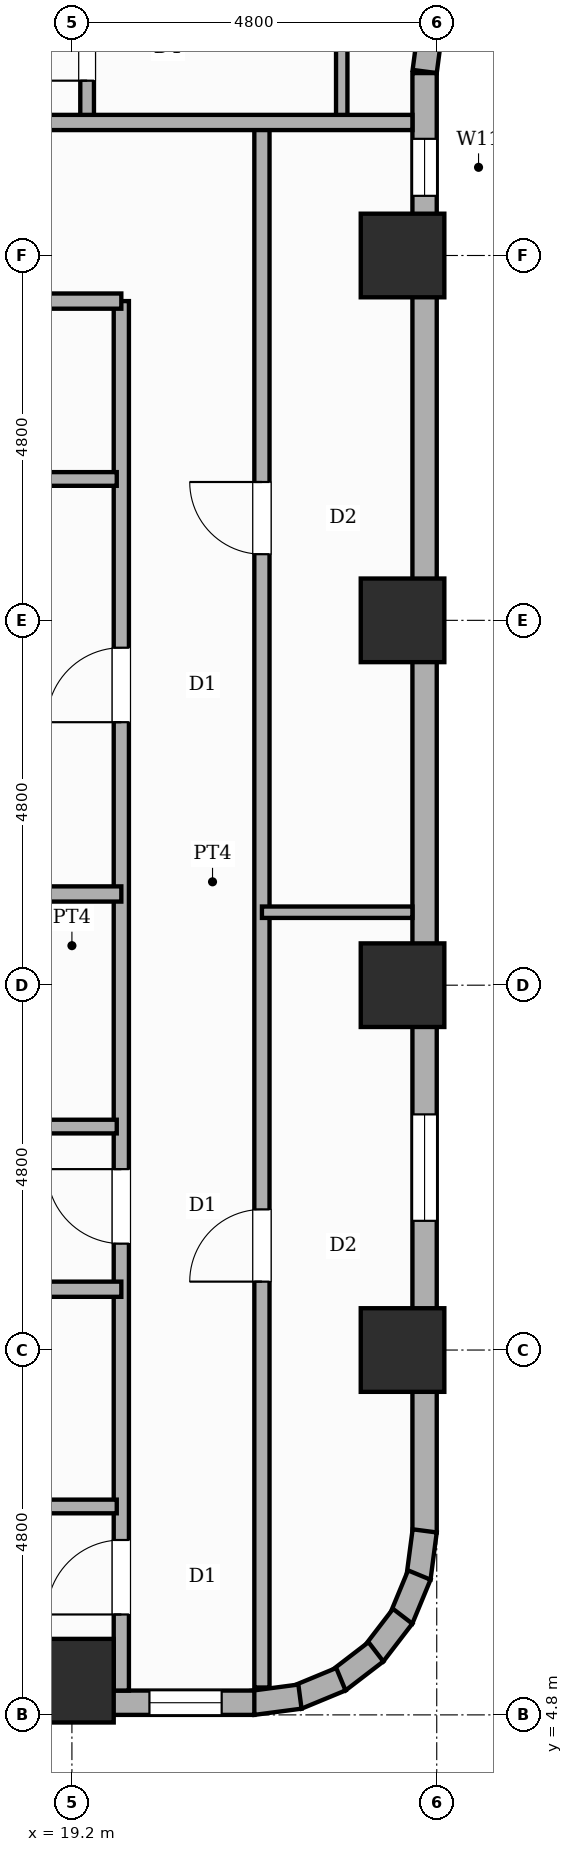
"""IFC4 building model, lengths in metres.
Left out: names, types, materials, properties, quantities, classifications, styles, units other than length and angle.
Written with IfcOpenShell. Run it as: python <this file> out.ifc"""

import sys

from ifc_helpers import new_model, si_unit, direction, frame, frame_2d, origin, origin_2d, place, context, subcontext, project, spatial, rectangle, extrude, element, fill, save


model = new_model("IFC4")
c1 = context("Model", 3, precision=1e-05, world=origin(), true_north=direction((0.0, 1.0)))
c2 = subcontext(c1, "Body", "Model", "MODEL_VIEW")
j1 = project(units=[si_unit("LENGTHUNIT", "METRE"), si_unit("PLANEANGLEUNIT", "RADIAN")], contexts=[c1])
p1 = place(None, origin())
s1 = spatial("IfcSite", under=j1, at=p1, CompositionType="ELEMENT")
p2 = place(p1, origin())
s2 = spatial("IfcBuilding", under=s1, at=p2, CompositionType="ELEMENT")
p3 = place(p2, frame((0.0, 0.0, 79.0)))
s3 = spatial("IfcBuildingStorey", under=s2, at=p3, CompositionType="ELEMENT", Elevation=79.0)
for number, where, z_axis, x_axis in (
    (1, (19.2, 5.25, 0.0), (0.0, 0.0, 1.0), (1.0, 0.0, 0.0)),
    (2, (23.55, 9.6, 0.0), (0.0, 0.0, 1.0), (1.0, 0.0, 0.0)),
    (3, (23.55, 14.4, 0.0), (0.0, 0.0, 1.0), (1.0, 0.0, 0.0)),
    (4, (23.55, 19.2, 0.0), (0.0, 0.0, 1.0), (1.0, 0.0, 0.0)),
    (5, (23.55, 24.0, 0.0), (0.0, 0.0, 1.0), (1.0, 0.0, 0.0)),
):
    element("IfcColumn", number, at=place(p3, frame(where, z_axis=z_axis, x_axis=x_axis)), inside=s3, PredefinedType="COLUMN", context=c2, shape_type="SweptSolid", body=[
        extrude(rectangle(XDim=1.1, YDim=1.1, at=origin_2d()), origin(), (0.0, 0.0, 1.0), 3.6),
    ])
p4 = place(p3, frame((23.923, 27.042, 0.0), z_axis=(0.0, 0.0, 1.0), x_axis=(-0.130555323746, -0.9914410257, 0.0)))
e6 = element("IfcWall", 6, at=p4, inside=s3, PredefinedType="STANDARD", context=c2, shape_type="SweptSolid", body=[
    extrude(rectangle(XDim=0.626, YDim=0.32, at=frame_2d((0.313, 0.0))), origin(), (0.0, 0.0, 1.0), 2.53),
])
p5 = place(p3, frame((23.84, 26.4, 0.0), z_axis=(0.0, 0.0, 1.0), x_axis=(0.0, -1.0, 0.0)))
e7 = element("IfcWall", 7, at=p5, inside=s3, PredefinedType="STANDARD", context=c2, shape_type="SweptSolid", body=[
    extrude(rectangle(XDim=19.2, YDim=0.32, at=frame_2d((9.6, 0.0))), origin(), (0.0, 0.0, 1.0), 2.53),
])
p6 = place(p5, frame((13.7, 0.0, 0.65)))
e8 = element("IfcOpeningElement", 8, at=p6, cuts=e7, PredefinedType="OPENING", context=c2, shape_type="SweptSolid", body=[
    extrude(rectangle(XDim=1.4, YDim=1.1, at=frame_2d((0.7, 0.55))), frame((0.0, 0.17, 0.0), z_axis=(0.0, -1.0, 0.0), x_axis=(1.0, 0.0, 0.0)), (0.0, 0.0, 1.0), 0.34),
])
p7 = place(p5, frame((0.865, 0.0, 0.45)))
e9 = element("IfcOpeningElement", 9, at=p7, cuts=e7, PredefinedType="OPENING", context=c2, shape_type="SweptSolid", body=[
    extrude(rectangle(XDim=0.75, YDim=1.8, at=frame_2d((0.375, 0.9))), frame((0.0, 0.17, 0.0), z_axis=(0.0, -1.0, 0.0), x_axis=(1.0, 0.0, 0.0)), (0.0, 0.0, 1.0), 0.34),
])
p8 = place(p3, frame((23.841, 7.221, 0.0), z_axis=(0.0, 0.0, 1.0), x_axis=(-0.130504898859, -0.991447664465, 0.0)))
e10 = element("IfcWall", 10, at=p8, inside=s3, PredefinedType="STANDARD", context=c2, shape_type="SweptSolid", body=[
    extrude(rectangle(XDim=0.627, YDim=0.32, at=frame_2d((0.313, 0.0))), origin(), (0.0, 0.0, 1.0), 3.35),
])
p9 = place(p3, frame((23.771, 6.64, 0.0), z_axis=(0.0, 0.0, 1.0), x_axis=(-0.382787856107, -0.923836271867, 0.0)))
e11 = element("IfcWall", 11, at=p9, inside=s3, PredefinedType="STANDARD", context=c2, shape_type="SweptSolid", body=[
    extrude(rectangle(XDim=0.626, YDim=0.32, at=frame_2d((0.313, 0.0))), origin(), (0.0, 0.0, 1.0), 3.35),
])
p10 = place(p3, frame((23.552, 6.097, 0.0), z_axis=(0.0, 0.0, 1.0), x_axis=(-0.608693302629, -0.793405610854, 0.0)))
e12 = element("IfcWall", 12, at=p10, inside=s3, PredefinedType="STANDARD", context=c2, shape_type="SweptSolid", body=[
    extrude(rectangle(XDim=0.626, YDim=0.32, at=frame_2d((0.313, 0.0))), origin(), (0.0, 0.0, 1.0), 3.35),
])
p11 = place(p3, frame((23.2, 5.63, 0.0), z_axis=(0.0, 0.0, 1.0), x_axis=(-0.7932174212, -0.608938521285, 0.0)))
e13 = element("IfcWall", 13, at=p11, inside=s3, PredefinedType="STANDARD", context=c2, shape_type="SweptSolid", body=[
    extrude(rectangle(XDim=0.627, YDim=0.32, at=frame_2d((0.313, 0.0))), origin(), (0.0, 0.0, 1.0), 3.35),
])
for number, where, z_axis, x_axis in (
    (14, (22.739, 5.269, 0.0), (0.0, 0.0, 1.0), (-0.924, -0.383, 0.0)),
    (15, (22.2, 5.04, 0.0), (0.0, 0.0, 1.0), (-0.991, -0.131, 0.0)),
):
    element("IfcWall", number, at=place(p3, frame(where, z_axis=z_axis, x_axis=x_axis)), inside=s3, PredefinedType="STANDARD", context=c2, shape_type="SweptSolid", body=[
        extrude(rectangle(XDim=0.626, YDim=0.32, at=frame_2d((0.313, 0.0))), origin(), (0.0, 0.0, 1.0), 3.35),
    ])
p12 = place(p3, frame((21.6, 4.96, 0.0), z_axis=(0.0, 0.0, 1.0), x_axis=(-1.0, 0.0, 0.0)))
e16 = element("IfcWall", 16, at=p12, inside=s3, PredefinedType="STANDARD", context=c2, shape_type="SweptSolid", body=[
    extrude(rectangle(XDim=14.4, YDim=0.32, at=frame_2d((7.2, 0.0))), origin(), (0.0, 0.0, 1.0), 2.53),
])
p13 = place(p12, frame((4.1, 0.0, 0.65)))
e17 = element("IfcOpeningElement", 17, at=p13, cuts=e16, PredefinedType="OPENING", context=c2, shape_type="SweptSolid", body=[
    extrude(rectangle(XDim=1.4, YDim=1.1, at=frame_2d((0.7, 0.55))), frame((0.0, 0.17, 0.0), z_axis=(0.0, -1.0, 0.0), x_axis=(1.0, 0.0, 0.0)), (0.0, 0.0, 1.0), 0.34),
])
p14 = place(p12, frame((0.43, 0.0, 0.45)))
e18 = element("IfcOpeningElement", 18, at=p14, cuts=e16, PredefinedType="OPENING", context=c2, shape_type="SweptSolid", body=[
    extrude(rectangle(XDim=0.95, YDim=1.8, at=frame_2d((0.475, 0.9))), frame((0.0, 0.17, 0.0), z_axis=(0.0, -1.0, 0.0), x_axis=(1.0, 0.0, 0.0)), (0.0, 0.0, 1.0), 0.34),
])
p15 = place(p3, frame((22.75, 25.75, 0.0), z_axis=(0.0, 0.0, 1.0), x_axis=(0.0, 1.0, 0.0)))
e19 = element("IfcWall", 19, at=p15, inside=s3, PredefinedType="PARTITIONING", context=c2, shape_type="SweptSolid", body=[
    extrude(rectangle(XDim=2.25, YDim=0.15, at=frame_2d((1.125, 0.0))), origin(), (0.0, 0.0, 1.0), 3.35),
])
p16 = place(p3, frame((19.4, 25.75, 0.0), z_axis=(0.0, 0.0, 1.0), x_axis=(0.0, 1.0, 0.0)))
e20 = element("IfcWall", 20, at=p16, inside=s3, PredefinedType="PLUMBINGWALL", context=c2, shape_type="SweptSolid", body=[
    extrude(rectangle(XDim=2.25, YDim=0.18, at=frame_2d((1.125, 0.0))), origin(), (0.0, 0.0, 1.0), 3.35),
])
p17 = place(p16, frame((0.55, 0.0, 0.0)))
e21 = element("IfcOpeningElement", 21, at=p17, cuts=e20, PredefinedType="OPENING", context=c2, shape_type="SweptSolid", body=[
    extrude(rectangle(XDim=0.86, YDim=2.1, at=frame_2d((0.43, 1.05))), frame((0.0, 0.1, 0.0), z_axis=(0.0, -1.0, 0.0), x_axis=(1.0, 0.0, 0.0)), (0.0, 0.0, 1.0), 0.2),
])
p18 = place(p3, frame((19.85, 5.12, 0.0), z_axis=(0.0, 0.0, 1.0), x_axis=(0.0, 1.0, 0.0)))
e22 = element("IfcWall", 22, at=p18, inside=s3, PredefinedType="PARTITIONING", context=c2, shape_type="SweptSolid", body=[
    extrude(rectangle(XDim=18.28, YDim=0.2, at=frame_2d((9.14, 0.0))), origin(), (0.0, 0.0, 1.0), 3.35),
])
p19 = place(p18, frame((1.001, 0.0, 0.0)))
e23 = element("IfcOpeningElement", 23, at=p19, cuts=e22, PredefinedType="OPENING", context=c2, shape_type="SweptSolid", body=[
    extrude(rectangle(XDim=0.98, YDim=2.18, at=frame_2d((0.49, 1.09))), frame((0.0, 0.11, 0.0), z_axis=(0.0, -1.0, 0.0), x_axis=(1.0, 0.0, 0.0)), (0.0, 0.0, 1.0), 0.22),
])
p20 = place(p18, frame((5.88, 0.0, 0.0)))
e24 = element("IfcOpeningElement", 24, at=p20, cuts=e22, PredefinedType="OPENING", context=c2, shape_type="SweptSolid", body=[
    extrude(rectangle(XDim=0.98, YDim=2.18, at=frame_2d((0.49, 1.09))), frame((0.0, 0.11, 0.0), z_axis=(0.0, -1.0, 0.0), x_axis=(1.0, 0.0, 0.0)), (0.0, 0.0, 1.0), 0.22),
])
p21 = place(p18, frame((12.74, 0.0, 0.0)))
e25 = element("IfcOpeningElement", 25, at=p21, cuts=e22, PredefinedType="OPENING", context=c2, shape_type="SweptSolid", body=[
    extrude(rectangle(XDim=0.98, YDim=2.18, at=frame_2d((0.49, 1.09))), frame((0.0, 0.11, 0.0), z_axis=(0.0, -1.0, 0.0), x_axis=(1.0, 0.0, 0.0)), (0.0, 0.0, 1.0), 0.22),
])
p22 = place(p3, frame((21.7, 5.16, 0.0), z_axis=(0.0, 0.0, 1.0), x_axis=(0.0, 1.0, 0.0)))
e26 = element("IfcWall", 26, at=p22, inside=s3, PredefinedType="PARTITIONING", context=c2, shape_type="SweptSolid", body=[
    extrude(rectangle(XDim=20.59, YDim=0.2, at=frame_2d((10.295, 0.0))), origin(), (0.0, 0.0, 1.0), 3.35),
])
p23 = place(p22, frame((5.34, 0.0, 0.0)))
e27 = element("IfcOpeningElement", 27, at=p23, cuts=e26, PredefinedType="OPENING", context=c2, shape_type="SweptSolid", body=[
    extrude(rectangle(XDim=0.95, YDim=2.15, at=frame_2d((0.475, 1.075))), frame((0.0, 0.11, 0.0), z_axis=(0.0, -1.0, 0.0), x_axis=(1.0, 0.0, 0.0)), (0.0, 0.0, 1.0), 0.22),
])
p24 = place(p22, frame((14.91, 0.0, 0.0)))
e28 = element("IfcOpeningElement", 28, at=p24, cuts=e26, PredefinedType="OPENING", context=c2, shape_type="SweptSolid", body=[
    extrude(rectangle(XDim=0.95, YDim=2.15, at=frame_2d((0.475, 1.075))), frame((0.0, 0.11, 0.0), z_axis=(0.0, -1.0, 0.0), x_axis=(1.0, 0.0, 0.0)), (0.0, 0.0, 1.0), 0.22),
])
p25 = place(p3, frame((5.12, 23.4, 0.0), z_axis=(0.0, 0.0, 1.0), x_axis=(1.0, 0.0, 0.0)))
e29 = element("IfcWall", 29, at=p25, inside=s3, PredefinedType="PARTITIONING", context=c2, shape_type="SweptSolid", body=[
    extrude(rectangle(XDim=14.73, YDim=0.2, at=frame_2d((7.365, 0.0))), origin(), (0.0, 0.0, 1.0), 3.35),
])
p26 = place(p3, frame((15.5, 25.75, 0.0), z_axis=(0.0, 0.0, 1.0), x_axis=(1.0, 0.0, 0.0)))
e30 = element("IfcWall", 30, at=p26, inside=s3, PredefinedType="PARTITIONING", context=c2, shape_type="SweptSolid", body=[
    extrude(rectangle(XDim=8.18, YDim=0.2, at=frame_2d((4.09, 0.0))), origin(), (0.0, 0.0, 1.0), 3.35),
])
p27 = place(p3, frame((5.12, 7.542, 0.0), z_axis=(0.0, 0.0, 1.0), x_axis=(1.0, 0.0, 0.0)))
e31 = element("IfcWall", 31, at=p27, inside=s3, PredefinedType="PLUMBINGWALL", context=c2, shape_type="SweptSolid", body=[
    extrude(rectangle(XDim=14.67, YDim=0.18, at=frame_2d((7.335, 0.0))), origin(), (0.0, 0.0, 1.0), 3.35),
])
p28 = place(p27, frame((3.145, 0.0, 0.0)))
e32 = element("IfcOpeningElement", 32, at=p28, cuts=e31, PredefinedType="OPENING", context=c2, shape_type="SweptSolid", body=[
    extrude(rectangle(XDim=0.86, YDim=2.1, at=frame_2d((0.43, 1.05))), frame((0.0, 0.1, 0.0), z_axis=(0.0, -1.0, 0.0), x_axis=(1.0, 0.0, 0.0)), (0.0, 0.0, 1.0), 0.2),
])
p29 = place(p27, frame((10.56, 0.0, 0.0)))
e33 = element("IfcOpeningElement", 33, at=p29, cuts=e31, PredefinedType="OPENING", context=c2, shape_type="SweptSolid", body=[
    extrude(rectangle(XDim=0.86, YDim=2.1, at=frame_2d((0.43, 1.05))), frame((0.0, 0.1, 0.0), z_axis=(0.0, -1.0, 0.0), x_axis=(1.0, 0.0, 0.0)), (0.0, 0.0, 1.0), 0.2),
])
p30 = place(p3, frame((5.12, 10.4, 0.0), z_axis=(0.0, 0.0, 1.0), x_axis=(1.0, 0.0, 0.0)))
e34 = element("IfcWall", 34, at=p30, inside=s3, PredefinedType="SOLIDWALL", context=c2, shape_type="SweptSolid", body=[
    extrude(rectangle(XDim=14.73, YDim=0.2, at=frame_2d((7.365, 0.0))), origin(), (0.0, 0.0, 1.0), 3.35),
])
p31 = place(p3, frame((5.12, 12.54, 0.0), z_axis=(0.0, 0.0, 1.0), x_axis=(1.0, 0.0, 0.0)))
e35 = element("IfcWall", 35, at=p31, inside=s3, PredefinedType="PLUMBINGWALL", context=c2, shape_type="SweptSolid", body=[
    extrude(rectangle(XDim=14.67, YDim=0.18, at=frame_2d((7.335, 0.0))), origin(), (0.0, 0.0, 1.0), 3.35),
])
p32 = place(p31, frame((3.145, 0.0, 0.0)))
e36 = element("IfcOpeningElement", 36, at=p32, cuts=e35, PredefinedType="OPENING", context=c2, shape_type="SweptSolid", body=[
    extrude(rectangle(XDim=0.86, YDim=2.1, at=frame_2d((0.43, 1.05))), frame((0.0, 0.1, 0.0), z_axis=(0.0, -1.0, 0.0), x_axis=(1.0, 0.0, 0.0)), (0.0, 0.0, 1.0), 0.2),
])
p33 = place(p31, frame((10.56, 0.0, 0.0)))
e37 = element("IfcOpeningElement", 37, at=p33, cuts=e35, PredefinedType="OPENING", context=c2, shape_type="SweptSolid", body=[
    extrude(rectangle(XDim=0.86, YDim=2.1, at=frame_2d((0.43, 1.05))), frame((0.0, 0.1, 0.0), z_axis=(0.0, -1.0, 0.0), x_axis=(1.0, 0.0, 0.0)), (0.0, 0.0, 1.0), 0.2),
])
p34 = place(p3, frame((5.12, 15.6, 0.0), z_axis=(0.0, 0.0, 1.0), x_axis=(1.0, 0.0, 0.0)))
e38 = element("IfcWall", 38, at=p34, inside=s3, PredefinedType="SOLIDWALL", context=c2, shape_type="SweptSolid", body=[
    extrude(rectangle(XDim=14.73, YDim=0.2, at=frame_2d((7.365, 0.0))), origin(), (0.0, 0.0, 1.0), 3.35),
])
p35 = place(p3, frame((5.12, 21.06, 0.0), z_axis=(0.0, 0.0, 1.0), x_axis=(1.0, 0.0, 0.0)))
e39 = element("IfcWall", 39, at=p35, inside=s3, PredefinedType="PLUMBINGWALL", context=c2, shape_type="SweptSolid", body=[
    extrude(rectangle(XDim=14.67, YDim=0.18, at=frame_2d((7.335, 0.0))), origin(), (0.0, 0.0, 1.0), 3.35),
])
p36 = place(p35, frame((2.284, 0.0, 0.0)))
e40 = element("IfcOpeningElement", 40, at=p36, cuts=e39, PredefinedType="OPENING", context=c2, shape_type="SweptSolid", body=[
    extrude(rectangle(XDim=0.9, YDim=2.15, at=frame_2d((0.45, 1.075))), frame((0.0, 0.1, 0.0), z_axis=(0.0, -1.0, 0.0), x_axis=(1.0, 0.0, 0.0)), (0.0, 0.0, 1.0), 0.2),
])
p37 = place(p35, frame((7.908, 0.0, 0.0)))
e41 = element("IfcOpeningElement", 41, at=p37, cuts=e39, PredefinedType="OPENING", context=c2, shape_type="SweptSolid", body=[
    extrude(rectangle(XDim=0.9, YDim=2.15, at=frame_2d((0.45, 1.075))), frame((0.0, 0.1, 0.0), z_axis=(0.0, -1.0, 0.0), x_axis=(1.0, 0.0, 0.0)), (0.0, 0.0, 1.0), 0.2),
])
p38 = place(p35, frame((12.088, 0.0, 0.0)))
e42 = element("IfcOpeningElement", 42, at=p38, cuts=e39, PredefinedType="OPENING", context=c2, shape_type="SweptSolid", body=[
    extrude(rectangle(XDim=0.86, YDim=2.1, at=frame_2d((0.43, 1.05))), frame((0.0, 0.1, 0.0), z_axis=(0.0, -1.0, 0.0), x_axis=(1.0, 0.0, 0.0)), (0.0, 0.0, 1.0), 0.2),
])
p39 = place(p3, frame((21.7, 15.36, 0.0), z_axis=(0.0, 0.0, 1.0), x_axis=(1.0, 0.0, 0.0)))
e43 = element("IfcWall", 43, at=p39, inside=s3, PredefinedType="PARTITIONING", context=c2, shape_type="SweptSolid", body=[
    extrude(rectangle(XDim=1.98, YDim=0.15, at=frame_2d((0.99, 0.0))), origin(), (0.0, 0.0, 1.0), 3.35),
])
p40 = place(p6, origin())
e44 = element("IfcWindow", 44, at=p40, inside=s3, PartitioningType="SINGLE_PANEL", PredefinedType="WINDOW", context=c2, shape_type="SweptSolid", body=[
    extrude(rectangle(XDim=1.4, YDim=1.1, at=frame_2d((0.7, 0.55))), frame((0.0, 0.03, 0.0), z_axis=(0.0, -1.0, 0.0), x_axis=(1.0, 0.0, 0.0)), (0.0, 0.0, 1.0), 0.06),
])
fill(e8, e44)
p41 = place(p7, origin())
e45 = element("IfcWindow", 45, at=p41, inside=s3, PartitioningType="SINGLE_PANEL", PredefinedType="WINDOW", context=c2, shape_type="SweptSolid", body=[
    extrude(rectangle(XDim=0.75, YDim=1.8, at=frame_2d((0.375, 0.9))), frame((0.0, 0.03, 0.0), z_axis=(0.0, -1.0, 0.0), x_axis=(1.0, 0.0, 0.0)), (0.0, 0.0, 1.0), 0.06),
])
fill(e9, e45)
p42 = place(p14, origin())
e46 = element("IfcWindow", 46, at=p42, inside=s3, PartitioningType="SINGLE_PANEL", PredefinedType="WINDOW", context=c2, shape_type="SweptSolid", body=[
    extrude(rectangle(XDim=0.95, YDim=1.8, at=frame_2d((0.475, 0.9))), frame((0.0, 0.03, 0.0), z_axis=(0.0, -1.0, 0.0), x_axis=(1.0, 0.0, 0.0)), (0.0, 0.0, 1.0), 0.06),
])
fill(e18, e46)
p43 = place(p17, origin())
e47 = element("IfcDoor", 47, at=p43, inside=s3, OperationType="SINGLE_SWING_LEFT", PredefinedType="DOOR", context=c2, shape_type="SweptSolid", body=[
    extrude(rectangle(XDim=0.86, YDim=2.1, at=frame_2d((0.43, 1.05))), frame((0.0, 0.025, 0.0), z_axis=(0.0, -1.0, 0.0), x_axis=(1.0, 0.0, 0.0)), (0.0, 0.0, 1.0), 0.05),
])
fill(e21, e47)
p44 = place(p19, origin())
e48 = element("IfcDoor", 48, at=p44, inside=s3, OperationType="SINGLE_SWING_LEFT", PredefinedType="DOOR", context=c2, shape_type="SweptSolid", body=[
    extrude(rectangle(XDim=0.98, YDim=2.18, at=frame_2d((0.49, 1.09))), frame((0.0, 0.025, 0.0), z_axis=(0.0, -1.0, 0.0), x_axis=(1.0, 0.0, 0.0)), (0.0, 0.0, 1.0), 0.05),
])
fill(e23, e48)
p45 = place(p20, origin())
e49 = element("IfcDoor", 49, at=p45, inside=s3, OperationType="SINGLE_SWING_RIGHT", PredefinedType="DOOR", context=c2, shape_type="SweptSolid", body=[
    extrude(rectangle(XDim=0.98, YDim=2.18, at=frame_2d((0.49, 1.09))), frame((0.0, 0.025, 0.0), z_axis=(0.0, -1.0, 0.0), x_axis=(1.0, 0.0, 0.0)), (0.0, 0.0, 1.0), 0.05),
])
fill(e24, e49)
p46 = place(p21, origin())
e50 = element("IfcDoor", 50, at=p46, inside=s3, OperationType="SINGLE_SWING_LEFT", PredefinedType="DOOR", context=c2, shape_type="SweptSolid", body=[
    extrude(rectangle(XDim=0.98, YDim=2.18, at=frame_2d((0.49, 1.09))), frame((0.0, 0.025, 0.0), z_axis=(0.0, -1.0, 0.0), x_axis=(1.0, 0.0, 0.0)), (0.0, 0.0, 1.0), 0.05),
])
fill(e25, e50)
p47 = place(p23, origin())
e51 = element("IfcDoor", 51, at=p47, inside=s3, OperationType="SINGLE_SWING_LEFT", PredefinedType="DOOR", context=c2, shape_type="SweptSolid", body=[
    extrude(rectangle(XDim=0.95, YDim=2.15, at=frame_2d((0.475, 1.075))), frame((0.0, 0.025, 0.0), z_axis=(0.0, -1.0, 0.0), x_axis=(1.0, 0.0, 0.0)), (0.0, 0.0, 1.0), 0.05),
])
fill(e27, e51)
p48 = place(p24, origin())
e52 = element("IfcDoor", 52, at=p48, inside=s3, OperationType="SINGLE_SWING_RIGHT", PredefinedType="DOOR", context=c2, shape_type="SweptSolid", body=[
    extrude(rectangle(XDim=0.95, YDim=2.15, at=frame_2d((0.475, 1.075))), frame((0.0, 0.025, 0.0), z_axis=(0.0, -1.0, 0.0), x_axis=(1.0, 0.0, 0.0)), (0.0, 0.0, 1.0), 0.05),
])
fill(e28, e52)
save(model, sys.argv[1])
